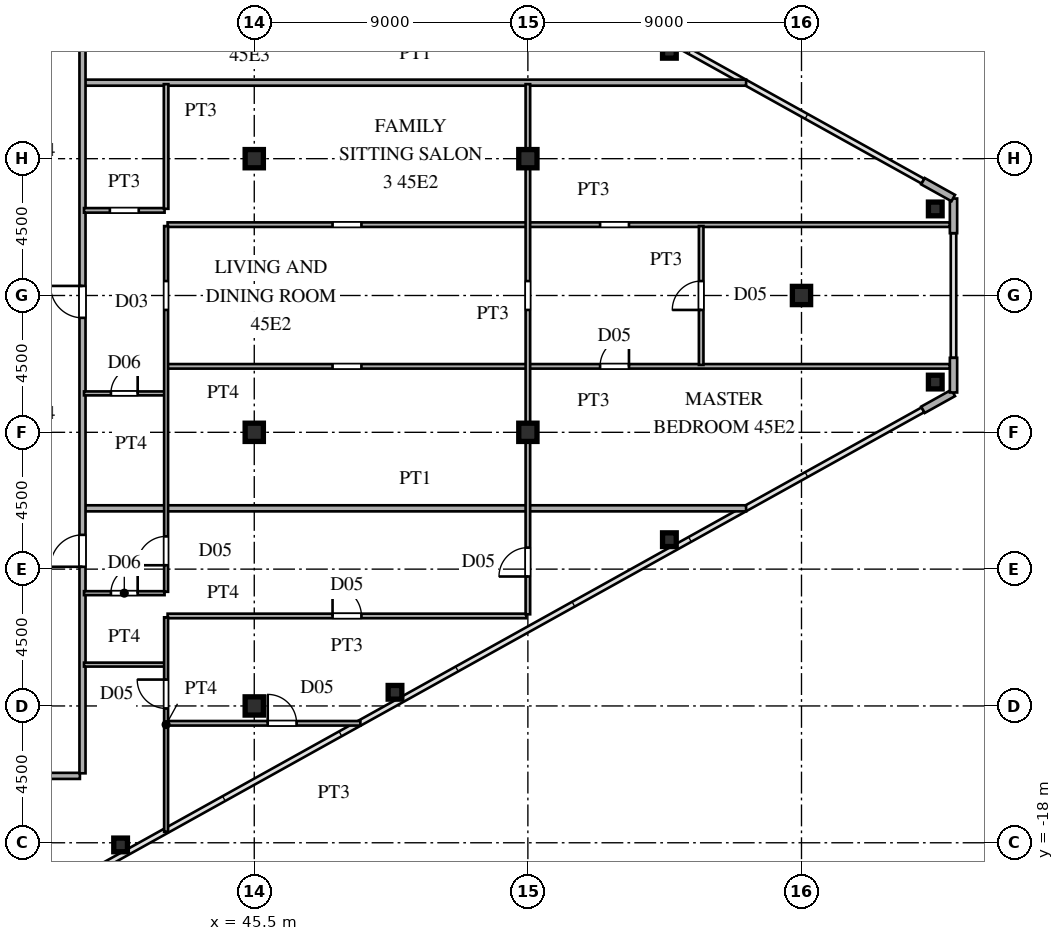
"""IFC4 building model, lengths in metres.
Left out: names, types, materials, properties, quantities, classifications, styles, units other than length and angle.
Written with IfcOpenShell. Run it as: python <this file> out.ifc"""

import sys

from ifc_helpers import new_model, si_unit, direction, frame, frame_2d, origin, origin_2d, place, context, subcontext, project, spatial, rectangle, hollow_rectangle, i_section, extrude, source, transform, mapped, element, fill, save


model = new_model("IFC4")
c1 = context("Model", 3, precision=1e-05, world=origin(), true_north=direction((0.0, 1.0)))
c2 = subcontext(c1, "Body", "Model", "MODEL_VIEW")
j1 = project(units=[si_unit("LENGTHUNIT", "METRE"), si_unit("PLANEANGLEUNIT", "RADIAN")], contexts=[c1])
p1 = place(None, origin())
s1 = spatial("IfcSite", under=j1, at=p1, CompositionType="ELEMENT")
p2 = place(p1, origin())
s2 = spatial("IfcBuilding", under=s1, at=p2, CompositionType="ELEMENT")
p3 = place(p2, frame((0.0, 0.0, 170.7)))
s3 = spatial("IfcBuildingStorey", under=s2, at=p3, CompositionType="ELEMENT", Elevation=170.7)
m1 = source(origin(), c2, "Body", "SweptSolid", [
    extrude(i_section(OverallWidth=0.6, OverallDepth=0.6, WebThickness=0.025, FlangeThickness=0.04, at=origin_2d()), origin(), (0.0, 0.0, 1.0), 3.6),
])
for number, where, z_axis, x_axis in (
    (1, (45.5, -13.5, 0.0), (0.0, 0.0, 1.0), (1.0, 0.0, 0.0)),
    (2, (45.5, -4.5, 0.0), (0.0, 0.0, 1.0), (1.0, 0.0, 0.0)),
    (3, (45.5, 4.5, 0.0), (0.0, 0.0, 1.0), (1.0, 0.0, 0.0)),
    (4, (54.5, -4.5, 0.0), (0.0, 0.0, 1.0), (1.0, 0.0, 0.0)),
    (5, (54.5, 4.5, 0.0), (0.0, 0.0, 1.0), (1.0, 0.0, 0.0)),
    (6, (63.5, 0.0, 0.0), (0.0, 0.0, 1.0), (1.0, 0.0, 0.0)),
):
    element("IfcColumn", number, at=place(p3, frame(where, z_axis=z_axis, x_axis=x_axis)), inside=s3, PredefinedType="COLUMN", context=c2, shape_type="MappedRepresentation", body=[
        mapped(m1, transform((0.0, 0.0, 0.0), scale=1.0)),
    ])
m2 = source(origin(), c2, "Body", "SweptSolid", [
    extrude(hollow_rectangle(XDim=0.45, YDim=0.45, WallThickness=0.018, at=origin_2d()), origin(), (0.0, 0.0, 1.0), 3.6),
])
for number, where, z_axis, x_axis in (
    (7, (67.9, -2.847, 0.0), (0.0, 0.0, 1.0), (1.0, 0.0, 0.0)),
    (8, (67.9, 2.847, 0.0), (0.0, 0.0, 1.0), (1.0, 0.0, 0.0)),
    (9, (41.104, -18.071, 0.0), (0.0, 0.0, 1.0), (1.0, 0.0, 0.0)),
    (10, (50.129, -13.051, 0.0), (0.0, 0.0, 1.0), (1.0, 0.0, 0.0)),
    (11, (59.155, -8.031, 0.0), (0.0, 0.0, 1.0), (1.0, 0.0, 0.0)),
    (12, (59.155, 8.031, 0.0), (0.0, 0.0, 1.0), (1.0, 0.0, 0.0)),
):
    element("IfcColumn", number, at=place(p3, frame(where, z_axis=z_axis, x_axis=x_axis)), inside=s3, PredefinedType="COLUMN", context=c2, shape_type="MappedRepresentation", body=[
        mapped(m2, transform((0.0, 0.0, 0.0), scale=1.0)),
    ])
for number, where, z_axis, x_axis in (
    (13, (67.495, -3.759, 0.0), (0.0, 0.0, 1.0), (0.874, 0.486, 0.0)),
    (14, (68.5, -3.19, 0.0), (0.0, 0.0, 1.0), (0.0, 1.0, 0.0)),
    (15, (68.5, 2.05, 0.0), (0.0, 0.0, 1.0), (0.0, 1.0, 0.0)),
    (16, (68.491, 3.205, 0.0), (0.0, 0.0, 1.0), (-0.874, 0.486, 0.0)),
):
    element("IfcWall", number, at=place(p3, frame(where, z_axis=z_axis, x_axis=x_axis)), inside=s3, PredefinedType="SOLIDWALL", context=c2, shape_type="SweptSolid", body=[
        extrude(rectangle(XDim=1.14, YDim=0.24, at=frame_2d((0.57, 0.0))), origin(), (0.0, 0.0, 1.0), 3.38),
    ])
p4 = place(p3, frame((27.5, -15.8, 0.0), z_axis=(0.0, 0.0, 1.0), x_axis=(1.0, 0.0, 0.0)))
e17 = element("IfcWall", 17, at=p4, inside=s3, PredefinedType="PARTITIONING", context=c2, shape_type="SweptSolid", body=[
    extrude(rectangle(XDim=12.265, YDim=0.2, at=frame_2d((6.132, 0.0))), origin(), (0.0, 0.0, 1.0), 3.38),
])
p5 = place(p3, frame((42.65, -14.07, 0.0), z_axis=(0.0, 0.0, 1.0), x_axis=(1.0, 0.0, 0.0)))
e18 = element("IfcWall", 18, at=p5, inside=s3, PredefinedType="PARTITIONING", context=c2, shape_type="SweptSolid", body=[
    extrude(rectangle(XDim=6.341, YDim=0.15, at=frame_2d((3.17, 0.0))), origin(), (0.0, 0.0, 1.0), 3.38),
])
p6 = place(p5, frame((3.292, 0.0, 0.0)))
e19 = element("IfcOpeningElement", 19, at=p6, cuts=e18, PredefinedType="OPENING", context=c2, shape_type="SweptSolid", body=[
    extrude(rectangle(XDim=0.95, YDim=2.15, at=frame_2d((0.475, 1.075))), frame((0.0, 0.085, 0.0), z_axis=(0.0, -1.0, 0.0), x_axis=(1.0, 0.0, 0.0)), (0.0, 0.0, 1.0), 0.17),
])
p7 = place(p3, frame((39.9, -12.14, 0.0), z_axis=(0.0, 0.0, 1.0), x_axis=(1.0, 0.0, 0.0)))
e20 = element("IfcWall", 20, at=p7, inside=s3, PredefinedType="PARTITIONING", context=c2, shape_type="SweptSolid", body=[
    extrude(rectangle(XDim=2.65, YDim=0.13, at=frame_2d((1.325, 0.0))), origin(), (0.0, 0.0, 1.0), 3.38),
])
p8 = place(p3, frame((42.65, -10.54, 0.0), z_axis=(0.0, 0.0, 1.0), x_axis=(1.0, 0.0, 0.0)))
e21 = element("IfcWall", 21, at=p8, inside=s3, PredefinedType="PARTITIONING", context=c2, shape_type="SweptSolid", body=[
    extrude(rectangle(XDim=11.8, YDim=0.15, at=frame_2d((5.9, 0.0))), origin(), (0.0, 0.0, 1.0), 3.38),
])
p9 = place(p8, frame((5.425, 0.0, 0.0)))
e22 = element("IfcOpeningElement", 22, at=p9, cuts=e21, PredefinedType="OPENING", context=c2, shape_type="SweptSolid", body=[
    extrude(rectangle(XDim=0.95, YDim=2.15, at=frame_2d((0.475, 1.075))), frame((0.0, 0.085, 0.0), z_axis=(0.0, -1.0, 0.0), x_axis=(1.0, 0.0, 0.0)), (0.0, 0.0, 1.0), 0.17),
])
p10 = place(p3, frame((39.9, -9.79, 0.0), z_axis=(0.0, 0.0, 1.0), x_axis=(1.0, 0.0, 0.0)))
e23 = element("IfcWall", 23, at=p10, inside=s3, PredefinedType="PARTITIONING", context=c2, shape_type="SweptSolid", body=[
    extrude(rectangle(XDim=2.65, YDim=0.13, at=frame_2d((1.325, 0.0))), origin(), (0.0, 0.0, 1.0), 3.38),
])
p11 = place(p10, frame((0.885, 0.0, 0.0)))
e24 = element("IfcOpeningElement", 24, at=p11, cuts=e23, PredefinedType="OPENING", context=c2, shape_type="SweptSolid", body=[
    extrude(rectangle(XDim=0.88, YDim=2.1, at=frame_2d((0.44, 1.05))), frame((0.0, 0.075, 0.0), z_axis=(0.0, -1.0, 0.0), x_axis=(1.0, 0.0, 0.0)), (0.0, 0.0, 1.0), 0.15),
])
p12 = place(p3, frame((39.93, -7.0, 0.0), z_axis=(0.0, 0.0, 1.0), x_axis=(1.0, 0.0, 0.0)))
e25 = element("IfcWall", 25, at=p12, inside=s3, PredefinedType="PARTITIONING", context=c2, shape_type="SweptSolid", body=[
    extrude(rectangle(XDim=21.748, YDim=0.2, at=frame_2d((10.874, 0.0))), origin(), (0.0, 0.0, 1.0), 3.38),
])
p13 = place(p3, frame((39.9, -3.22, 0.0), z_axis=(0.0, 0.0, 1.0), x_axis=(1.0, 0.0, 0.0)))
e26 = element("IfcWall", 26, at=p13, inside=s3, PredefinedType="PARTITIONING", context=c2, shape_type="SweptSolid", body=[
    extrude(rectangle(XDim=2.65, YDim=0.13, at=frame_2d((1.325, 0.0))), origin(), (0.0, 0.0, 1.0), 3.38),
])
p14 = place(p13, frame((0.885, 0.0, 0.0)))
e27 = element("IfcOpeningElement", 27, at=p14, cuts=e26, PredefinedType="OPENING", context=c2, shape_type="SweptSolid", body=[
    extrude(rectangle(XDim=0.88, YDim=2.1, at=frame_2d((0.44, 1.05))), frame((0.0, 0.075, 0.0), z_axis=(0.0, -1.0, 0.0), x_axis=(1.0, 0.0, 0.0)), (0.0, 0.0, 1.0), 0.15),
])
p15 = place(p3, frame((42.65, -2.33, 0.0), z_axis=(0.0, 0.0, 1.0), x_axis=(1.0, 0.0, 0.0)))
e28 = element("IfcWall", 28, at=p15, inside=s3, PredefinedType="PARTITIONING", context=c2, shape_type="SweptSolid", body=[
    extrude(rectangle(XDim=25.725, YDim=0.15, at=frame_2d((12.863, 0.0))), origin(), (0.0, 0.0, 1.0), 3.38),
])
p16 = place(p15, frame((5.425, 0.0, 0.0)))
e29 = element("IfcOpeningElement", 29, at=p16, cuts=e28, PredefinedType="OPENING", context=c2, shape_type="SweptSolid", body=[
    extrude(rectangle(XDim=0.95, YDim=2.15, at=frame_2d((0.475, 1.075))), frame((0.0, 0.085, 0.0), z_axis=(0.0, -1.0, 0.0), x_axis=(1.0, 0.0, 0.0)), (0.0, 0.0, 1.0), 0.17),
])
p17 = place(p15, frame((14.225, 0.0, 0.0)))
e30 = element("IfcOpeningElement", 30, at=p17, cuts=e28, PredefinedType="OPENING", context=c2, shape_type="SweptSolid", body=[
    extrude(rectangle(XDim=0.95, YDim=2.15, at=frame_2d((0.475, 1.075))), frame((0.0, 0.085, 0.0), z_axis=(0.0, -1.0, 0.0), x_axis=(1.0, 0.0, 0.0)), (0.0, 0.0, 1.0), 0.17),
])
p18 = place(p3, frame((42.65, 2.33, 0.0), z_axis=(0.0, 0.0, 1.0), x_axis=(1.0, 0.0, 0.0)))
e31 = element("IfcWall", 31, at=p18, inside=s3, PredefinedType="PARTITIONING", context=c2, shape_type="SweptSolid", body=[
    extrude(rectangle(XDim=25.725, YDim=0.15, at=frame_2d((12.863, 0.0))), origin(), (0.0, 0.0, 1.0), 3.38),
])
p19 = place(p18, frame((5.425, 0.0, 0.0)))
e32 = element("IfcOpeningElement", 32, at=p19, cuts=e31, PredefinedType="OPENING", context=c2, shape_type="SweptSolid", body=[
    extrude(rectangle(XDim=0.95, YDim=2.15, at=frame_2d((0.475, 1.075))), frame((0.0, 0.085, 0.0), z_axis=(0.0, -1.0, 0.0), x_axis=(1.0, 0.0, 0.0)), (0.0, 0.0, 1.0), 0.17),
])
p20 = place(p18, frame((14.225, 0.0, 0.0)))
e33 = element("IfcOpeningElement", 33, at=p20, cuts=e31, PredefinedType="OPENING", context=c2, shape_type="SweptSolid", body=[
    extrude(rectangle(XDim=0.95, YDim=2.15, at=frame_2d((0.475, 1.075))), frame((0.0, 0.085, 0.0), z_axis=(0.0, -1.0, 0.0), x_axis=(1.0, 0.0, 0.0)), (0.0, 0.0, 1.0), 0.17),
])
p21 = place(p3, frame((39.9, 2.8, 0.0), z_axis=(0.0, 0.0, 1.0), x_axis=(1.0, 0.0, 0.0)))
e34 = element("IfcWall", 34, at=p21, inside=s3, PredefinedType="PARTITIONING", context=c2, shape_type="SweptSolid", body=[
    extrude(rectangle(XDim=2.65, YDim=0.15, at=frame_2d((1.325, 0.0))), origin(), (0.0, 0.0, 1.0), 3.38),
])
p22 = place(p21, frame((0.85, 0.0, 0.0)))
e35 = element("IfcOpeningElement", 35, at=p22, cuts=e34, PredefinedType="OPENING", context=c2, shape_type="SweptSolid", body=[
    extrude(rectangle(XDim=0.95, YDim=2.15, at=frame_2d((0.475, 1.075))), frame((0.0, 0.085, 0.0), z_axis=(0.0, -1.0, 0.0), x_axis=(1.0, 0.0, 0.0)), (0.0, 0.0, 1.0), 0.17),
])
p23 = place(p3, frame((39.93, 7.0, 0.0), z_axis=(0.0, 0.0, 1.0), x_axis=(1.0, 0.0, 0.0)))
e36 = element("IfcWall", 36, at=p23, inside=s3, PredefinedType="PARTITIONING", context=c2, shape_type="SweptSolid", body=[
    extrude(rectangle(XDim=21.748, YDim=0.2, at=frame_2d((10.874, 0.0))), origin(), (0.0, 0.0, 1.0), 3.38),
])
p24 = place(p3, frame((39.85, -15.715, 0.0), z_axis=(0.0, 0.0, 1.0), x_axis=(0.0, 1.0, 0.0)))
e37 = element("IfcWall", 37, at=p24, inside=s3, PredefinedType="PARTITIONING", context=c2, shape_type="SweptSolid", body=[
    extrude(rectangle(XDim=31.43, YDim=0.2, at=frame_2d((15.715, 0.0))), origin(), (0.0, 0.0, 1.0), 3.38),
])
p25 = place(p24, frame((6.792, 0.0, 0.0)))
e38 = element("IfcOpeningElement", 38, at=p25, cuts=e37, PredefinedType="OPENING", context=c2, shape_type="SweptSolid", body=[
    extrude(rectangle(XDim=1.05, YDim=2.25, at=frame_2d((0.525, 1.125))), frame((0.0, 0.11, 0.0), z_axis=(0.0, -1.0, 0.0), x_axis=(1.0, 0.0, 0.0)), (0.0, 0.0, 1.0), 0.22),
])
p26 = place(p24, frame((14.98, 0.0, 0.0)))
e39 = element("IfcOpeningElement", 39, at=p26, cuts=e37, PredefinedType="OPENING", context=c2, shape_type="SweptSolid", body=[
    extrude(rectangle(XDim=1.05, YDim=2.25, at=frame_2d((0.525, 1.125))), frame((0.0, 0.11, 0.0), z_axis=(0.0, -1.0, 0.0), x_axis=(1.0, 0.0, 0.0)), (0.0, 0.0, 1.0), 0.22),
])
p27 = place(p24, frame((26.59, 0.0, 0.0)))
e40 = element("IfcOpeningElement", 40, at=p27, cuts=e37, PredefinedType="OPENING", context=c2, shape_type="SweptSolid", body=[
    extrude(rectangle(XDim=1.05, YDim=2.25, at=frame_2d((0.525, 1.125))), frame((0.0, 0.11, 0.0), z_axis=(0.0, -1.0, 0.0), x_axis=(1.0, 0.0, 0.0)), (0.0, 0.0, 1.0), 0.22),
])
p28 = place(p3, frame((42.6, -17.64, 0.0), z_axis=(0.0, 0.0, 1.0), x_axis=(0.0, 1.0, 0.0)))
e41 = element("IfcWall", 41, at=p28, inside=s3, PredefinedType="PARTITIONING", context=c2, shape_type="SweptSolid", body=[
    extrude(rectangle(XDim=7.055, YDim=0.13, at=frame_2d((3.527, 0.0))), origin(), (0.0, 0.0, 1.0), 3.38),
])
p29 = place(p28, frame((4.058, 0.0, 0.0)))
e42 = element("IfcOpeningElement", 42, at=p29, cuts=e41, PredefinedType="OPENING", context=c2, shape_type="SweptSolid", body=[
    extrude(rectangle(XDim=0.95, YDim=2.15, at=frame_2d((0.475, 1.075))), frame((0.0, 0.075, 0.0), z_axis=(0.0, -1.0, 0.0), x_axis=(1.0, 0.0, 0.0)), (0.0, 0.0, 1.0), 0.15),
])
p30 = place(p3, frame((42.6, -9.745, 0.0), z_axis=(0.0, 0.0, 1.0), x_axis=(0.0, 1.0, 0.0)))
e43 = element("IfcWall", 43, at=p30, inside=s3, PredefinedType="PARTITIONING", context=c2, shape_type="SweptSolid", body=[
    extrude(rectangle(XDim=12.028, YDim=0.13, at=frame_2d((6.014, 0.0))), origin(), (0.0, 0.0, 1.0), 3.38),
])
p31 = place(p30, frame((0.873, 0.0, 0.0)))
e44 = element("IfcOpeningElement", 44, at=p31, cuts=e43, PredefinedType="OPENING", context=c2, shape_type="SweptSolid", body=[
    extrude(rectangle(XDim=0.95, YDim=2.15, at=frame_2d((0.475, 1.075))), frame((0.0, 0.075, 0.0), z_axis=(0.0, -1.0, 0.0), x_axis=(1.0, 0.0, 0.0)), (0.0, 0.0, 1.0), 0.15),
])
p32 = place(p30, frame((9.27, 0.0, 0.0)))
e45 = element("IfcOpeningElement", 45, at=p32, cuts=e43, PredefinedType="OPENING", context=c2, shape_type="SweptSolid", body=[
    extrude(rectangle(XDim=0.95, YDim=2.15, at=frame_2d((0.475, 1.075))), frame((0.0, 0.075, 0.0), z_axis=(0.0, -1.0, 0.0), x_axis=(1.0, 0.0, 0.0)), (0.0, 0.0, 1.0), 0.15),
])
p33 = place(p3, frame((42.6, 2.852, 0.0), z_axis=(0.0, 0.0, 1.0), x_axis=(0.0, 1.0, 0.0)))
e46 = element("IfcWall", 46, at=p33, inside=s3, PredefinedType="PARTITIONING", context=c2, shape_type="SweptSolid", body=[
    extrude(rectangle(XDim=4.098, YDim=0.15, at=frame_2d((2.049, 0.0))), origin(), (0.0, 0.0, 1.0), 3.38),
])
p34 = place(p3, frame((54.5, -10.485, 0.0), z_axis=(0.0, 0.0, 1.0), x_axis=(0.0, 1.0, 0.0)))
e47 = element("IfcWall", 47, at=p34, inside=s3, PredefinedType="PARTITIONING", context=c2, shape_type="SweptSolid", body=[
    extrude(rectangle(XDim=17.435, YDim=0.15, at=frame_2d((8.718, 0.0))), origin(), (0.0, 0.0, 1.0), 2.78),
])
p35 = place(p34, frame((1.242, 0.0, 0.0)))
e48 = element("IfcOpeningElement", 48, at=p35, cuts=e47, PredefinedType="OPENING", context=c2, shape_type="SweptSolid", body=[
    extrude(rectangle(XDim=0.95, YDim=2.15, at=frame_2d((0.475, 1.075))), frame((0.0, 0.085, 0.0), z_axis=(0.0, -1.0, 0.0), x_axis=(1.0, 0.0, 0.0)), (0.0, 0.0, 1.0), 0.17),
])
p36 = place(p34, frame((10.01, 0.0, 0.0)))
e49 = element("IfcOpeningElement", 49, at=p36, cuts=e47, PredefinedType="OPENING", context=c2, shape_type="SweptSolid", body=[
    extrude(rectangle(XDim=0.95, YDim=2.15, at=frame_2d((0.475, 1.075))), frame((0.0, 0.085, 0.0), z_axis=(0.0, -1.0, 0.0), x_axis=(1.0, 0.0, 0.0)), (0.0, 0.0, 1.0), 0.17),
])
p37 = place(p3, frame((60.2, -2.283, 0.0), z_axis=(0.0, 0.0, 1.0), x_axis=(0.0, 1.0, 0.0)))
e50 = element("IfcWall", 50, at=p37, inside=s3, PredefinedType="PARTITIONING", context=c2, shape_type="SweptSolid", body=[
    extrude(rectangle(XDim=4.566, YDim=0.15, at=frame_2d((2.283, 0.0))), origin(), (0.0, 0.0, 1.0), 3.38),
])
p38 = place(p37, frame((1.808, 0.0, 0.0)))
e51 = element("IfcOpeningElement", 51, at=p38, cuts=e50, PredefinedType="OPENING", context=c2, shape_type="SweptSolid", body=[
    extrude(rectangle(XDim=0.95, YDim=2.15, at=frame_2d((0.475, 1.075))), frame((0.0, 0.085, 0.0), z_axis=(0.0, -1.0, 0.0), x_axis=(1.0, 0.0, 0.0)), (0.0, 0.0, 1.0), 0.17),
])
m3 = source(origin(), c2, "Body", "SweptSolid", [
    extrude(rectangle(XDim=0.95, YDim=2.15, at=frame_2d((0.475, 1.075))), frame((0.0, 0.025, 0.0), z_axis=(0.0, -1.0, 0.0), x_axis=(1.0, 0.0, 0.0)), (0.0, 0.0, 1.0), 0.05),
])
p39 = place(p6, origin())
e52 = element("IfcDoor", 52, at=p39, inside=s3, OperationType="SINGLE_SWING_LEFT", PredefinedType="DOOR", context=c2, shape_type="MappedRepresentation", body=[
    mapped(m3, transform((0.0, 0.0, 0.0), scale=1.0)),
])
fill(e19, e52)
p40 = place(p9, origin())
e53 = element("IfcDoor", 53, at=p40, inside=s3, OperationType="SINGLE_SWING_LEFT", PredefinedType="DOOR", context=c2, shape_type="MappedRepresentation", body=[
    mapped(m3, transform((0.0, 0.0, 0.0), scale=1.0)),
])
fill(e22, e53)
m4 = source(origin(), c2, "Body", "SweptSolid", [
    extrude(rectangle(XDim=0.88, YDim=2.1, at=frame_2d((0.44, 1.05))), frame((0.0, 0.025, 0.0), z_axis=(0.0, -1.0, 0.0), x_axis=(1.0, 0.0, 0.0)), (0.0, 0.0, 1.0), 0.05),
])
p41 = place(p11, origin())
e54 = element("IfcDoor", 54, at=p41, inside=s3, OperationType="SINGLE_SWING_RIGHT", PredefinedType="DOOR", context=c2, shape_type="MappedRepresentation", body=[
    mapped(m4, transform((0.0, 0.0, 0.0), scale=1.0)),
])
fill(e24, e54)
p42 = place(p14, origin())
e55 = element("IfcDoor", 55, at=p42, inside=s3, OperationType="SINGLE_SWING_RIGHT", PredefinedType="DOOR", context=c2, shape_type="MappedRepresentation", body=[
    mapped(m4, transform((0.0, 0.0, 0.0), scale=1.0)),
])
fill(e27, e55)
p43 = place(p17, origin())
e56 = element("IfcDoor", 56, at=p43, inside=s3, OperationType="SINGLE_SWING_RIGHT", PredefinedType="DOOR", context=c2, shape_type="MappedRepresentation", body=[
    mapped(m3, transform((0.0, 0.0, 0.0), scale=1.0)),
])
fill(e30, e56)
m5 = source(origin(), c2, "Body", "SweptSolid", [
    extrude(rectangle(XDim=1.05, YDim=2.25, at=frame_2d((0.525, 1.125))), frame((0.0, 0.025, 0.0), z_axis=(0.0, -1.0, 0.0), x_axis=(1.0, 0.0, 0.0)), (0.0, 0.0, 1.0), 0.05),
])
p44 = place(p25, origin())
e57 = element("IfcDoor", 57, at=p44, inside=s3, OperationType="SINGLE_SWING_LEFT", PredefinedType="DOOR", context=c2, shape_type="MappedRepresentation", body=[
    mapped(m5, transform((0.0, 0.0, 0.0), scale=1.0)),
])
fill(e38, e57)
p45 = place(p26, origin())
e58 = element("IfcDoor", 58, at=p45, inside=s3, OperationType="SINGLE_SWING_RIGHT", PredefinedType="DOOR", context=c2, shape_type="MappedRepresentation", body=[
    mapped(m5, transform((0.0, 0.0, 0.0), scale=1.0)),
])
fill(e39, e58)
p46 = place(p29, origin())
e59 = element("IfcDoor", 59, at=p46, inside=s3, OperationType="SINGLE_SWING_RIGHT", PredefinedType="DOOR", context=c2, shape_type="MappedRepresentation", body=[
    mapped(m3, transform((0.0, 0.0, 0.0), scale=1.0)),
])
fill(e42, e59)
p47 = place(p31, origin())
e60 = element("IfcDoor", 60, at=p47, inside=s3, OperationType="SINGLE_SWING_LEFT", PredefinedType="DOOR", context=c2, shape_type="MappedRepresentation", body=[
    mapped(m3, transform((0.0, 0.0, 0.0), scale=1.0)),
])
fill(e44, e60)
p48 = place(p35, origin())
e61 = element("IfcDoor", 61, at=p48, inside=s3, OperationType="SINGLE_SWING_LEFT", PredefinedType="DOOR", context=c2, shape_type="MappedRepresentation", body=[
    mapped(m3, transform((0.0, 0.0, 0.0), scale=1.0)),
])
fill(e48, e61)
p49 = place(p38, origin())
e62 = element("IfcDoor", 62, at=p49, inside=s3, OperationType="SINGLE_SWING_LEFT", PredefinedType="DOOR", context=c2, shape_type="MappedRepresentation", body=[
    mapped(m3, transform((0.0, 0.0, 0.0), scale=1.0)),
])
fill(e51, e62)
save(model, sys.argv[1])
